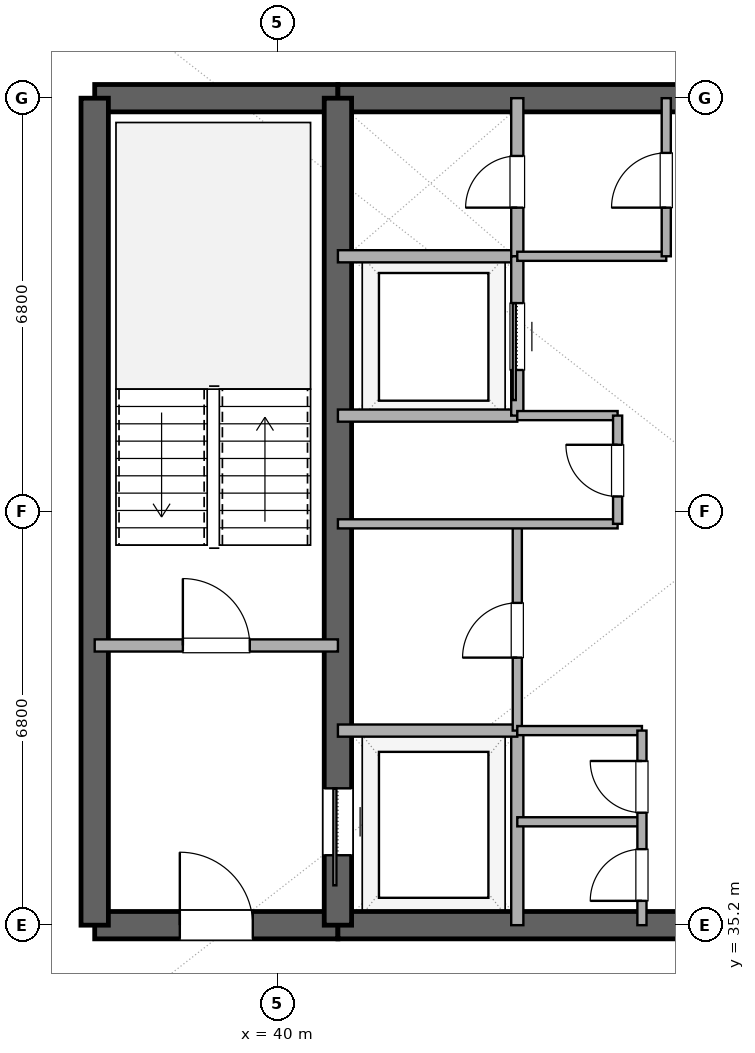
"""IFC4 building model, lengths in metres.
Left out: names, types, materials, properties, quantities, classifications, styles, units other than length and angle.
Written with IfcOpenShell. Run it as: python <this file> out.ifc"""

import sys

from ifc_helpers import new_model, si_unit, direction, frame, frame_2d, origin, place, context, subcontext, project, spatial, rectangle, extrude, element, fill, save


model = new_model("IFC4")
c1 = context("Model", 3, precision=1e-05, world=origin(), true_north=direction((0.0, 1.0)))
c2 = subcontext(c1, "Body", "Model", "MODEL_VIEW")
j1 = project(units=[si_unit("LENGTHUNIT", "METRE"), si_unit("PLANEANGLEUNIT", "RADIAN")], contexts=[c1])
p1 = place(None, origin())
s1 = spatial("IfcSite", under=j1, at=p1, CompositionType="ELEMENT")
p2 = place(p1, origin())
s2 = spatial("IfcBuilding", under=s1, at=p2, CompositionType="ELEMENT")
p3 = place(p2, frame((0.0, 0.0, 179.4)))
s3 = spatial("IfcBuildingStorey", under=s2, at=p3, CompositionType="ELEMENT", Elevation=179.4)
p4 = place(p3, frame((37.0, 35.2, 0.0), z_axis=(0.0, 0.0, 1.0), x_axis=(1.0, 0.0, 0.0)))
e1 = element("IfcWall", 1, at=p4, inside=s3, PredefinedType="SHEAR", context=c2, shape_type="SweptSolid", body=[
    extrude(rectangle(XDim=4.0, YDim=0.45, at=frame_2d((2.0, 0.0))), origin(), (0.0, 0.0, 1.0), 3.38),
])
p5 = place(p4, frame((1.4, 0.0, 0.0)))
e2 = element("IfcOpeningElement", 2, at=p5, cuts=e1, PredefinedType="OPENING", context=c2, shape_type="SweptSolid", body=[
    extrude(rectangle(XDim=1.2, YDim=2.15, at=frame_2d((0.6, 1.075))), frame((0.0, 0.235, 0.0), z_axis=(0.0, -1.0, 0.0), x_axis=(1.0, 0.0, 0.0)), (0.0, 0.0, 1.0), 0.47),
])
p6 = place(p3, frame((41.0, 35.2, 0.0), z_axis=(0.0, 0.0, 1.0), x_axis=(1.0, 0.0, 0.0)))
e3 = element("IfcWall", 3, at=p6, inside=s3, PredefinedType="SHEAR", context=c2, shape_type="SweptSolid", body=[
    extrude(rectangle(XDim=14.0, YDim=0.45, at=frame_2d((7.0, 0.0))), origin(), (0.0, 0.0, 1.0), 3.38),
])
p7 = place(p6, frame((6.1, 0.0, 0.0)))
e4 = element("IfcOpeningElement", 4, at=p7, cuts=e3, PredefinedType="OPENING", context=c2, shape_type="SweptSolid", body=[
    extrude(rectangle(XDim=1.8, YDim=2.25, at=frame_2d((0.9, 1.125))), frame((0.0, 0.235, 0.0), z_axis=(0.0, -1.0, 0.0), x_axis=(1.0, 0.0, 0.0)), (0.0, 0.0, 1.0), 0.47),
])
p8 = place(p3, frame((37.0, 48.8, 0.0), z_axis=(0.0, 0.0, 1.0), x_axis=(1.0, 0.0, 0.0)))
e5 = element("IfcWall", 5, at=p8, inside=s3, PredefinedType="SHEAR", context=c2, shape_type="SweptSolid", body=[
    extrude(rectangle(XDim=4.0, YDim=0.45, at=frame_2d((2.0, 0.0))), origin(), (0.0, 0.0, 1.0), 3.38),
])
p9 = place(p3, frame((41.0, 48.8, 0.0), z_axis=(0.0, 0.0, 1.0), x_axis=(1.0, 0.0, 0.0)))
e6 = element("IfcWall", 6, at=p9, inside=s3, PredefinedType="SHEAR", context=c2, shape_type="SweptSolid", body=[
    extrude(rectangle(XDim=14.0, YDim=0.45, at=frame_2d((7.0, 0.0))), origin(), (0.0, 0.0, 1.0), 3.38),
])
p10 = place(p9, frame((6.1, 0.0, 0.0)))
e7 = element("IfcOpeningElement", 7, at=p10, cuts=e6, PredefinedType="OPENING", context=c2, shape_type="SweptSolid", body=[
    extrude(rectangle(XDim=1.8, YDim=2.25, at=frame_2d((0.9, 1.125))), frame((0.0, 0.235, 0.0), z_axis=(0.0, -1.0, 0.0), x_axis=(1.0, 0.0, 0.0)), (0.0, 0.0, 1.0), 0.47),
])
p11 = place(p3, frame((37.0, 35.2, 0.0), z_axis=(0.0, 0.0, 1.0), x_axis=(0.0, 1.0, 0.0)))
e8 = element("IfcWall", 8, at=p11, inside=s3, PredefinedType="SHEAR", context=c2, shape_type="SweptSolid", body=[
    extrude(rectangle(XDim=13.6, YDim=0.45, at=frame_2d((6.8, 0.0))), origin(), (0.0, 0.0, 1.0), 3.38),
])
p12 = place(p3, frame((41.0, 35.2, 0.0), z_axis=(0.0, 0.0, 1.0), x_axis=(0.0, 1.0, 0.0)))
e9 = element("IfcWall", 9, at=p12, inside=s3, PredefinedType="SHEAR", context=c2, shape_type="SweptSolid", body=[
    extrude(rectangle(XDim=13.6, YDim=0.45, at=frame_2d((6.8, 0.0))), origin(), (0.0, 0.0, 1.0), 3.38),
])
p13 = place(p12, frame((1.15, 0.0, 0.0)))
e10 = element("IfcOpeningElement", 10, at=p13, cuts=e9, PredefinedType="OPENING", context=c2, shape_type="SweptSolid", body=[
    extrude(rectangle(XDim=1.1, YDim=2.2, at=frame_2d((0.55, 1.1))), frame((0.0, 0.235, 0.0), z_axis=(0.0, -1.0, 0.0), x_axis=(1.0, 0.0, 0.0)), (0.0, 0.0, 1.0), 0.47),
])
p14 = place(p3, frame((37.0, 39.8, 0.0), z_axis=(0.0, 0.0, 1.0), x_axis=(1.0, 0.0, 0.0)))
e11 = element("IfcWall", 11, at=p14, inside=s3, PredefinedType="SOLIDWALL", context=c2, shape_type="SweptSolid", body=[
    extrude(rectangle(XDim=4.0, YDim=0.2, at=frame_2d((2.0, 0.0))), origin(), (0.0, 0.0, 1.0), 2.74),
])
p15 = place(p14, frame((1.45, 0.0, 0.0)))
e12 = element("IfcOpeningElement", 12, at=p15, cuts=e11, PredefinedType="OPENING", context=c2, shape_type="SweptSolid", body=[
    extrude(rectangle(XDim=1.1, YDim=2.15, at=frame_2d((0.55, 1.075))), frame((0.0, 0.11, 0.0), z_axis=(0.0, -1.0, 0.0), x_axis=(1.0, 0.0, 0.0)), (0.0, 0.0, 1.0), 0.22),
])
p16 = place(p3, frame((43.95, 35.2, 0.0), z_axis=(0.0, 0.0, 1.0), x_axis=(0.0, 1.0, 0.0)))
e13 = element("IfcWall", 13, at=p16, inside=s3, PredefinedType="SOLIDWALL", context=c2, shape_type="SweptSolid", body=[
    extrude(rectangle(XDim=3.2, YDim=0.2, at=frame_2d((1.6, 0.0))), origin(), (0.0, 0.0, 1.0), 2.74),
])
for number, where, z_axis, x_axis in (
    (14, (41.0, 38.4, 0.0), (0.0, 0.0, 1.0), (1.0, 0.0, 0.0)),
    (15, (41.0, 46.2, 0.0), (0.0, 0.0, 1.0), (1.0, 0.0, 0.0)),
):
    element("IfcWall", number, at=place(p3, frame(where, z_axis=z_axis, x_axis=x_axis)), inside=s3, PredefinedType="SOLIDWALL", context=c2, shape_type="SweptSolid", body=[
        extrude(rectangle(XDim=2.95, YDim=0.2, at=frame_2d((1.475, 0.0))), origin(), (0.0, 0.0, 1.0), 2.74),
    ])
p17 = place(p3, frame((43.95, 46.2, 0.0), z_axis=(0.0, 0.0, 1.0), x_axis=(0.0, 1.0, 0.0)))
e16 = element("IfcWall", 16, at=p17, inside=s3, PredefinedType="SOLIDWALL", context=c2, shape_type="SweptSolid", body=[
    extrude(rectangle(XDim=2.6, YDim=0.2, at=frame_2d((1.3, 0.0))), origin(), (0.0, 0.0, 1.0), 2.74),
])
p18 = place(p17, frame((0.8, 0.0, 0.0)))
e17 = element("IfcOpeningElement", 17, at=p18, cuts=e16, PredefinedType="OPENING", context=c2, shape_type="SweptSolid", body=[
    extrude(rectangle(XDim=0.85, YDim=2.15, at=frame_2d((0.425, 1.075))), frame((0.0, 0.11, 0.0), z_axis=(0.0, -1.0, 0.0), x_axis=(1.0, 0.0, 0.0)), (0.0, 0.0, 1.0), 0.22),
])
p19 = place(p3, frame((41.0, 43.58, 0.0), z_axis=(0.0, 0.0, 1.0), x_axis=(1.0, 0.0, 0.0)))
e18 = element("IfcWall", 18, at=p19, inside=s3, PredefinedType="SOLIDWALL", context=c2, shape_type="SweptSolid", body=[
    extrude(rectangle(XDim=2.95, YDim=0.2, at=frame_2d((1.475, 0.0))), origin(), (0.0, 0.0, 1.0), 2.74),
])
p20 = place(p3, frame((43.95, 43.58, 0.0), z_axis=(0.0, 0.0, 1.0), x_axis=(0.0, 1.0, 0.0)))
e19 = element("IfcWall", 19, at=p20, inside=s3, PredefinedType="SOLIDWALL", context=c2, shape_type="SweptSolid", body=[
    extrude(rectangle(XDim=2.62, YDim=0.2, at=frame_2d((1.31, 0.0))), origin(), (0.0, 0.0, 1.0), 2.74),
])
p21 = place(p20, frame((0.75, 0.0, 0.0)))
e20 = element("IfcOpeningElement", 20, at=p21, cuts=e19, PredefinedType="OPENING", context=c2, shape_type="SweptSolid", body=[
    extrude(rectangle(XDim=1.1, YDim=2.2, at=frame_2d((0.55, 1.1))), frame((0.0, 0.11, 0.0), z_axis=(0.0, -1.0, 0.0), x_axis=(1.0, 0.0, 0.0)), (0.0, 0.0, 1.0), 0.22),
])
p22 = place(p3, frame((43.95, 38.4, 0.0), z_axis=(0.0, 0.0, 1.0), x_axis=(0.0, 1.0, 0.0)))
e21 = element("IfcWall", 21, at=p22, inside=s3, PredefinedType="PARTITIONING", context=c2, shape_type="SweptSolid", body=[
    extrude(rectangle(XDim=3.4, YDim=0.15, at=frame_2d((1.7, 0.0))), origin(), (0.0, 0.0, 1.0), 2.74),
])
p23 = place(p22, frame((1.2, 0.0, 0.0)))
e22 = element("IfcOpeningElement", 22, at=p23, cuts=e21, PredefinedType="OPENING", context=c2, shape_type="SweptSolid", body=[
    extrude(rectangle(XDim=0.9, YDim=2.15, at=frame_2d((0.45, 1.075))), frame((0.0, 0.085, 0.0), z_axis=(0.0, -1.0, 0.0), x_axis=(1.0, 0.0, 0.0)), (0.0, 0.0, 1.0), 0.17),
])
p24 = place(p3, frame((41.0, 41.8, 0.0), z_axis=(0.0, 0.0, 1.0), x_axis=(1.0, 0.0, 0.0)))
e23 = element("IfcWall", 23, at=p24, inside=s3, PredefinedType="PARTITIONING", context=c2, shape_type="SweptSolid", body=[
    extrude(rectangle(XDim=4.6, YDim=0.15, at=frame_2d((2.3, 0.0))), origin(), (0.0, 0.0, 1.0), 2.74),
])
p25 = place(p3, frame((43.95, 43.58, 0.0), z_axis=(0.0, 0.0, 1.0), x_axis=(1.0, 0.0, 0.0)))
e24 = element("IfcWall", 24, at=p25, inside=s3, PredefinedType="PARTITIONING", context=c2, shape_type="SweptSolid", body=[
    extrude(rectangle(XDim=1.65, YDim=0.15, at=frame_2d((0.825, 0.0))), origin(), (0.0, 0.0, 1.0), 2.74),
])
p26 = place(p3, frame((45.6, 41.8, 0.0), z_axis=(0.0, 0.0, 1.0), x_axis=(0.0, 1.0, 0.0)))
e25 = element("IfcWall", 25, at=p26, inside=s3, PredefinedType="PARTITIONING", context=c2, shape_type="SweptSolid", body=[
    extrude(rectangle(XDim=1.78, YDim=0.15, at=frame_2d((0.89, 0.0))), origin(), (0.0, 0.0, 1.0), 2.74),
])
p27 = place(p26, frame((0.45, 0.0, 0.0)))
e26 = element("IfcOpeningElement", 26, at=p27, cuts=e25, PredefinedType="OPENING", context=c2, shape_type="SweptSolid", body=[
    extrude(rectangle(XDim=0.85, YDim=2.15, at=frame_2d((0.425, 1.075))), frame((0.0, 0.085, 0.0), z_axis=(0.0, -1.0, 0.0), x_axis=(1.0, 0.0, 0.0)), (0.0, 0.0, 1.0), 0.17),
])
for number, where, z_axis, x_axis in (
    (27, (43.95, 36.9, 0.0), (0.0, 0.0, 1.0), (1.0, 0.0, 0.0)),
    (28, (43.95, 38.4, 0.0), (0.0, 0.0, 1.0), (1.0, 0.0, 0.0)),
):
    element("IfcWall", number, at=place(p3, frame(where, z_axis=z_axis, x_axis=x_axis)), inside=s3, PredefinedType="PARTITIONING", context=c2, shape_type="SweptSolid", body=[
        extrude(rectangle(XDim=2.05, YDim=0.15, at=frame_2d((1.025, 0.0))), origin(), (0.0, 0.0, 1.0), 2.74),
    ])
p28 = place(p3, frame((46.0, 35.2, 0.0), z_axis=(0.0, 0.0, 1.0), x_axis=(0.0, 1.0, 0.0)))
e29 = element("IfcWall", 29, at=p28, inside=s3, PredefinedType="PARTITIONING", context=c2, shape_type="SweptSolid", body=[
    extrude(rectangle(XDim=3.2, YDim=0.15, at=frame_2d((1.6, 0.0))), origin(), (0.0, 0.0, 1.0), 2.74),
])
p29 = place(p28, frame((0.4, 0.0, 0.0)))
e30 = element("IfcOpeningElement", 30, at=p29, cuts=e29, PredefinedType="OPENING", context=c2, shape_type="SweptSolid", body=[
    extrude(rectangle(XDim=0.85, YDim=2.15, at=frame_2d((0.425, 1.075))), frame((0.0, 0.085, 0.0), z_axis=(0.0, -1.0, 0.0), x_axis=(1.0, 0.0, 0.0)), (0.0, 0.0, 1.0), 0.17),
])
p30 = place(p28, frame((1.85, 0.0, 0.0)))
e31 = element("IfcOpeningElement", 31, at=p30, cuts=e29, PredefinedType="OPENING", context=c2, shape_type="SweptSolid", body=[
    extrude(rectangle(XDim=0.85, YDim=2.15, at=frame_2d((0.425, 1.075))), frame((0.0, 0.085, 0.0), z_axis=(0.0, -1.0, 0.0), x_axis=(1.0, 0.0, 0.0)), (0.0, 0.0, 1.0), 0.17),
])
p31 = place(p3, frame((43.95, 46.2, 0.0), z_axis=(0.0, 0.0, 1.0), x_axis=(1.0, 0.0, 0.0)))
e32 = element("IfcWall", 32, at=p31, inside=s3, PredefinedType="PARTITIONING", context=c2, shape_type="SweptSolid", body=[
    extrude(rectangle(XDim=2.45, YDim=0.15, at=frame_2d((1.225, 0.0))), origin(), (0.0, 0.0, 1.0), 2.74),
])
p32 = place(p3, frame((46.4, 46.2, 0.0), z_axis=(0.0, 0.0, 1.0), x_axis=(0.0, 1.0, 0.0)))
e33 = element("IfcWall", 33, at=p32, inside=s3, PredefinedType="PARTITIONING", context=c2, shape_type="SweptSolid", body=[
    extrude(rectangle(XDim=2.6, YDim=0.15, at=frame_2d((1.3, 0.0))), origin(), (0.0, 0.0, 1.0), 2.74),
])
p33 = place(p32, frame((0.8, 0.0, 0.0)))
e34 = element("IfcOpeningElement", 34, at=p33, cuts=e33, PredefinedType="OPENING", context=c2, shape_type="SweptSolid", body=[
    extrude(rectangle(XDim=0.9, YDim=2.15, at=frame_2d((0.45, 1.075))), frame((0.0, 0.085, 0.0), z_axis=(0.0, -1.0, 0.0), x_axis=(1.0, 0.0, 0.0)), (0.0, 0.0, 1.0), 0.17),
])
p34 = place(p13, origin())
e35 = element("IfcDoor", 35, at=p34, inside=s3, OperationType="SLIDING_TO_LEFT", PredefinedType="DOOR", context=c2, shape_type="SweptSolid", body=[
    extrude(rectangle(XDim=1.1, YDim=2.2, at=frame_2d((0.55, 1.1))), frame((0.0, 0.025, 0.0), z_axis=(0.0, -1.0, 0.0), x_axis=(1.0, 0.0, 0.0)), (0.0, 0.0, 1.0), 0.05),
])
fill(e10, e35)
p35 = place(p5, origin())
e36 = element("IfcDoor", 36, at=p35, inside=s3, OperationType="SINGLE_SWING_LEFT", PredefinedType="DOOR", context=c2, shape_type="SweptSolid", body=[
    extrude(rectangle(XDim=1.2, YDim=2.15, at=frame_2d((0.6, 1.075))), frame((0.0, 0.025, 0.0), z_axis=(0.0, -1.0, 0.0), x_axis=(1.0, 0.0, 0.0)), (0.0, 0.0, 1.0), 0.05),
])
fill(e2, e36)
p36 = place(p15, origin())
e37 = element("IfcDoor", 37, at=p36, inside=s3, OperationType="SINGLE_SWING_LEFT", PredefinedType="DOOR", context=c2, shape_type="SweptSolid", body=[
    extrude(rectangle(XDim=1.1, YDim=2.15, at=frame_2d((0.55, 1.075))), frame((0.0, 0.025, 0.0), z_axis=(0.0, -1.0, 0.0), x_axis=(1.0, 0.0, 0.0)), (0.0, 0.0, 1.0), 0.05),
])
fill(e12, e37)
p37 = place(p18, origin())
e38 = element("IfcDoor", 38, at=p37, inside=s3, OperationType="SINGLE_SWING_LEFT", PredefinedType="DOOR", context=c2, shape_type="SweptSolid", body=[
    extrude(rectangle(XDim=0.85, YDim=2.15, at=frame_2d((0.425, 1.075))), frame((0.0, 0.025, 0.0), z_axis=(0.0, -1.0, 0.0), x_axis=(1.0, 0.0, 0.0)), (0.0, 0.0, 1.0), 0.05),
])
fill(e17, e38)
p38 = place(p21, origin())
e39 = element("IfcDoor", 39, at=p38, inside=s3, OperationType="SLIDING_TO_LEFT", PredefinedType="DOOR", context=c2, shape_type="SweptSolid", body=[
    extrude(rectangle(XDim=1.1, YDim=2.2, at=frame_2d((0.55, 1.1))), frame((0.0, 0.025, 0.0), z_axis=(0.0, -1.0, 0.0), x_axis=(1.0, 0.0, 0.0)), (0.0, 0.0, 1.0), 0.05),
])
fill(e20, e39)
p39 = place(p23, origin())
e40 = element("IfcDoor", 40, at=p39, inside=s3, OperationType="SINGLE_SWING_LEFT", PredefinedType="DOOR", context=c2, shape_type="SweptSolid", body=[
    extrude(rectangle(XDim=0.9, YDim=2.15, at=frame_2d((0.45, 1.075))), frame((0.0, 0.025, 0.0), z_axis=(0.0, -1.0, 0.0), x_axis=(1.0, 0.0, 0.0)), (0.0, 0.0, 1.0), 0.05),
])
fill(e22, e40)
p40 = place(p27, origin())
e41 = element("IfcDoor", 41, at=p40, inside=s3, OperationType="SINGLE_SWING_RIGHT", PredefinedType="DOOR", context=c2, shape_type="SweptSolid", body=[
    extrude(rectangle(XDim=0.85, YDim=2.15, at=frame_2d((0.425, 1.075))), frame((0.0, 0.025, 0.0), z_axis=(0.0, -1.0, 0.0), x_axis=(1.0, 0.0, 0.0)), (0.0, 0.0, 1.0), 0.05),
])
fill(e26, e41)
p41 = place(p29, origin())
e42 = element("IfcDoor", 42, at=p41, inside=s3, OperationType="SINGLE_SWING_LEFT", PredefinedType="DOOR", context=c2, shape_type="SweptSolid", body=[
    extrude(rectangle(XDim=0.85, YDim=2.15, at=frame_2d((0.425, 1.075))), frame((0.0, 0.025, 0.0), z_axis=(0.0, -1.0, 0.0), x_axis=(1.0, 0.0, 0.0)), (0.0, 0.0, 1.0), 0.05),
])
fill(e30, e42)
p42 = place(p30, origin())
e43 = element("IfcDoor", 43, at=p42, inside=s3, OperationType="SINGLE_SWING_RIGHT", PredefinedType="DOOR", context=c2, shape_type="SweptSolid", body=[
    extrude(rectangle(XDim=0.85, YDim=2.15, at=frame_2d((0.425, 1.075))), frame((0.0, 0.025, 0.0), z_axis=(0.0, -1.0, 0.0), x_axis=(1.0, 0.0, 0.0)), (0.0, 0.0, 1.0), 0.05),
])
fill(e31, e43)
p43 = place(p33, origin())
e44 = element("IfcDoor", 44, at=p43, inside=s3, OperationType="SINGLE_SWING_LEFT", PredefinedType="DOOR", context=c2, shape_type="SweptSolid", body=[
    extrude(rectangle(XDim=0.9, YDim=2.15, at=frame_2d((0.45, 1.075))), frame((0.0, 0.025, 0.0), z_axis=(0.0, -1.0, 0.0), x_axis=(1.0, 0.0, 0.0)), (0.0, 0.0, 1.0), 0.05),
])
fill(e34, e44)
save(model, sys.argv[1])
